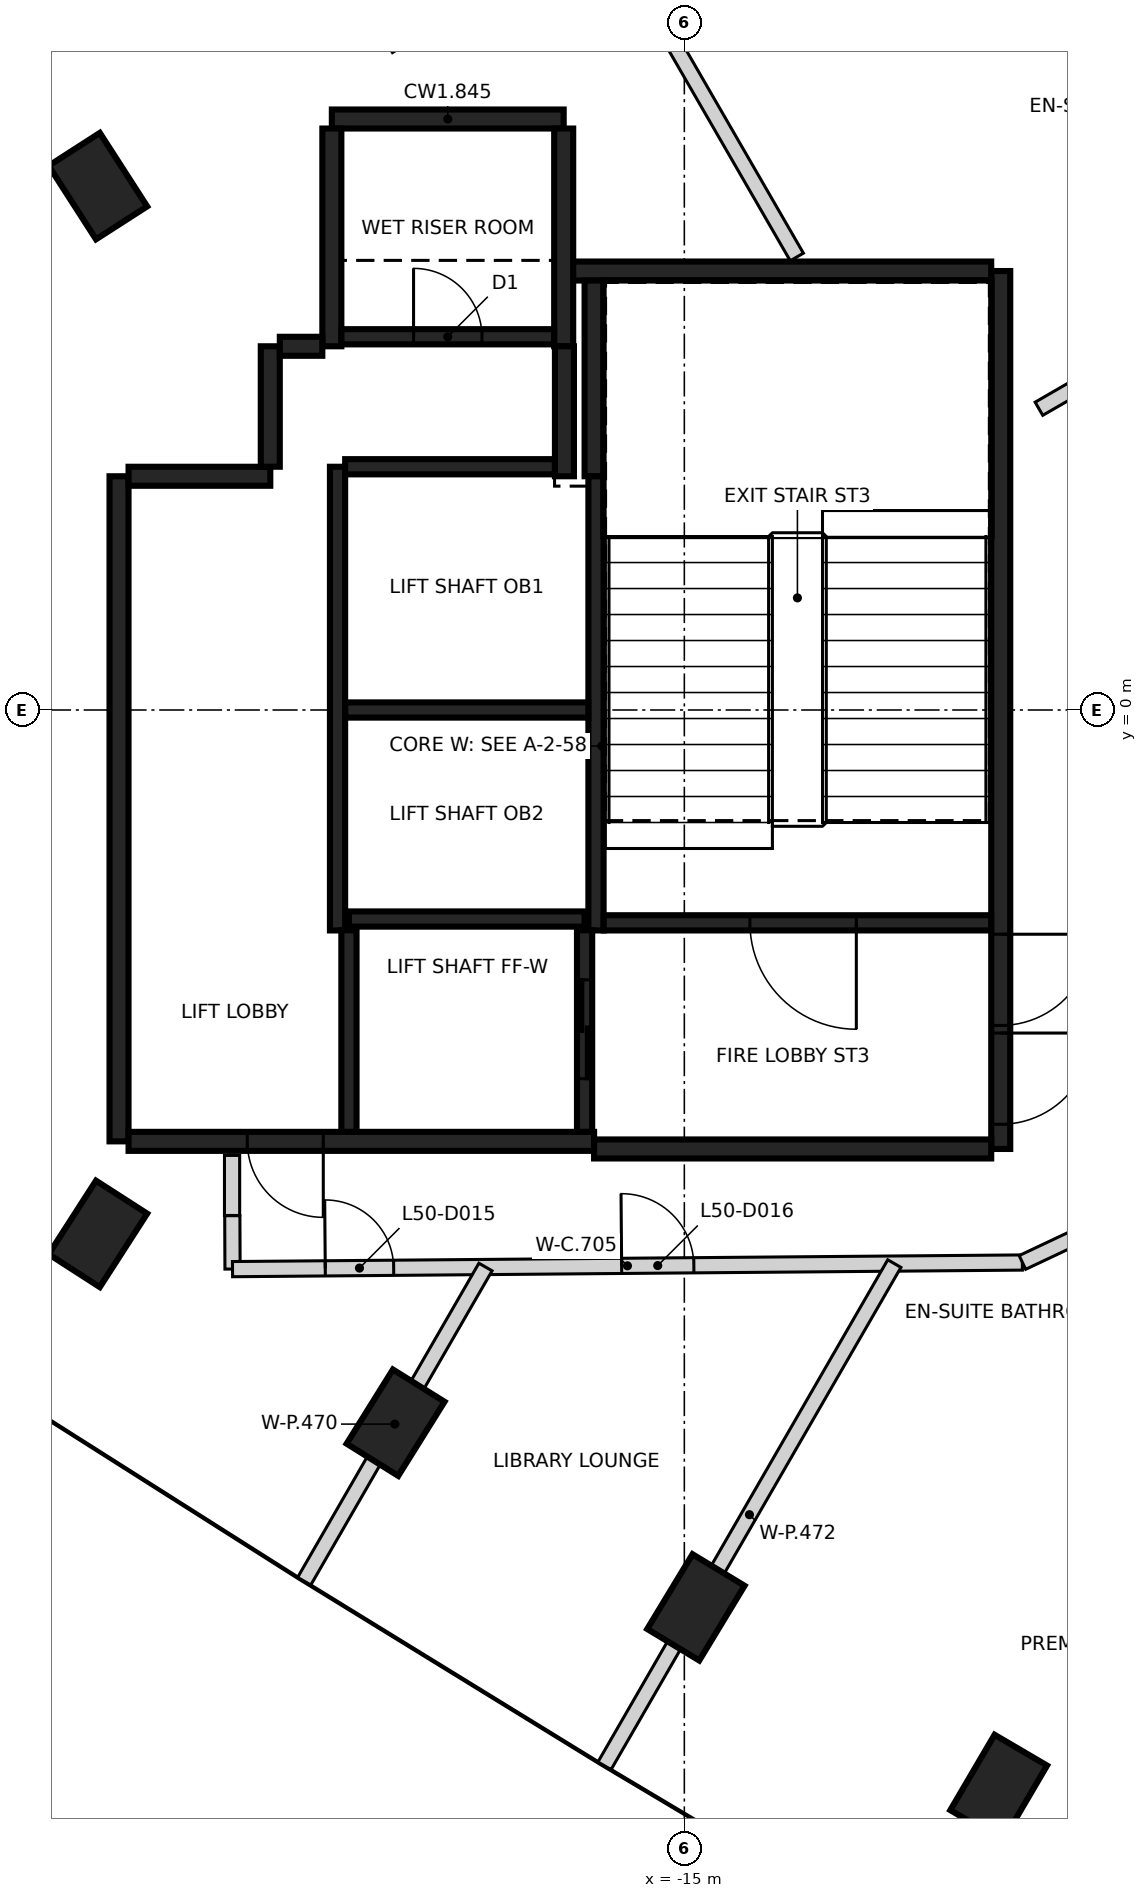
"""IFC4 building model, lengths in metres.
Left out: names, types, materials, properties, quantities, classifications, styles, units other than length and angle.
Written with IfcOpenShell. Run it as: python <this file> out.ifc"""

import sys

from ifc_helpers import new_model, si_unit, direction, frame, frame_2d, origin, origin_2d, place, context, subcontext, project, spatial, rectangle, extrude, element, fill, save


model = new_model("IFC4")
c1 = context("Model", 3, precision=1e-05, world=origin(), true_north=direction((0.0, 1.0)))
c2 = subcontext(c1, "Body", "Model", "MODEL_VIEW")
j1 = project(units=[si_unit("LENGTHUNIT", "METRE"), si_unit("PLANEANGLEUNIT", "RADIAN")], contexts=[c1])
p1 = place(None, origin())
s1 = spatial("IfcSite", under=j1, at=p1, CompositionType="ELEMENT")
p2 = place(p1, origin())
s2 = spatial("IfcBuilding", under=s1, at=p2, CompositionType="ELEMENT")
p3 = place(p2, frame((0.0, 0.0, 200.8)))
s3 = spatial("IfcBuildingStorey", under=s2, at=p3, CompositionType="ELEMENT", Elevation=200.8)
for number, where, z_axis, x_axis in (
    (1, (-22.715, 6.892, -0.35), (0.0, 0.0, 1.0), (-0.541, 0.841, 0.0)),
    (2, (-22.715, -6.892, -0.35), (0.0, 0.0, 1.0), (0.541, 0.841, 0.0)),
    (3, (-18.799, -9.376, -0.35), (0.0, 0.0, 1.0), (0.529, 0.848, 0.0)),
    (4, (-14.848, -11.806, -0.35), (0.0, 0.0, 1.0), (0.518, 0.855, 0.0)),
    (5, (-10.864, -14.18, -0.35), (0.0, 0.0, 1.0), (0.506, 0.862, 0.0)),
):
    element("IfcColumn", number, at=place(p3, frame(where, z_axis=z_axis, x_axis=x_axis)), inside=s3, PredefinedType="COLUMN", context=c2, shape_type="SweptSolid", body=[
        extrude(rectangle(XDim=1.15, YDim=0.8, at=origin_2d()), origin(), (0.0, 0.0, 1.0), 3.6),
    ])
p4 = place(p3, frame((-10.837, 5.775, 0.0), z_axis=(0.0, 0.0, 1.0), x_axis=(0.0, -1.0, 0.0)))
e6 = element("IfcWall", 6, at=p4, inside=s3, PredefinedType="SHEAR", context=c2, shape_type="SweptSolid", body=[
    extrude(rectangle(XDim=11.55, YDim=0.25, at=frame_2d((5.775, 0.0))), origin(), (0.0, 0.0, 1.0), 3.25),
])
p5 = place(p4, frame((10.025, 0.0, 0.0)))
e7 = element("IfcOpeningElement", 7, at=p5, cuts=e6, PredefinedType="OPENING", context=c2, shape_type="SweptSolid", body=[
    extrude(rectangle(XDim=1.2, YDim=2.1, at=frame_2d((0.6, 1.05))), frame((0.0, 0.135, 0.0), z_axis=(0.0, -1.0, 0.0), x_axis=(1.0, 0.0, 0.0)), (0.0, 0.0, 1.0), 0.27),
])
p6 = place(p4, frame((8.725, 0.0, 0.0)))
e8 = element("IfcOpeningElement", 8, at=p6, cuts=e6, PredefinedType="OPENING", context=c2, shape_type="SweptSolid", body=[
    extrude(rectangle(XDim=1.2, YDim=2.1, at=frame_2d((0.6, 1.05))), frame((0.0, 0.135, 0.0), z_axis=(0.0, -1.0, 0.0), x_axis=(1.0, 0.0, 0.0)), (0.0, 0.0, 1.0), 0.27),
])
p7 = place(p3, frame((-22.437, -5.675, 0.0), z_axis=(0.0, 0.0, 1.0), x_axis=(0.0, 1.0, 0.0)))
e9 = element("IfcWall", 9, at=p7, inside=s3, PredefinedType="SHEAR", context=c2, shape_type="SweptSolid", body=[
    extrude(rectangle(XDim=8.75, YDim=0.25, at=frame_2d((4.375, 0.0))), origin(), (0.0, 0.0, 1.0), 3.25),
])
p8 = place(p3, frame((-16.187, -5.675, 0.0), z_axis=(0.0, 0.0, 1.0), x_axis=(-1.0, 0.0, 0.0)))
e10 = element("IfcWall", 10, at=p8, inside=s3, PredefinedType="SHEAR", context=c2, shape_type="SweptSolid", body=[
    extrude(rectangle(XDim=6.125, YDim=0.25, at=frame_2d((3.062, 0.0))), origin(), (0.0, 0.0, 1.0), 3.25),
])
p9 = place(p8, frame((3.563, 0.0, 0.0)))
e11 = element("IfcOpeningElement", 11, at=p9, cuts=e10, PredefinedType="OPENING", context=c2, shape_type="SweptSolid", body=[
    extrude(rectangle(XDim=1.0, YDim=2.1, at=frame_2d((0.5, 1.05))), frame((0.0, 0.135, 0.0), z_axis=(0.0, -1.0, 0.0), x_axis=(1.0, 0.0, 0.0)), (0.0, 0.0, 1.0), 0.27),
])
p10 = place(p3, frame((-10.963, -5.775, 0.0), z_axis=(0.0, 0.0, 1.0), x_axis=(-1.0, 0.0, 0.0)))
e12 = element("IfcWall", 12, at=p10, inside=s3, PredefinedType="SHEAR", context=c2, shape_type="SweptSolid", body=[
    extrude(rectangle(XDim=5.225, YDim=0.25, at=frame_2d((2.612, 0.0))), origin(), (0.0, 0.0, 1.0), 3.25),
])
p11 = place(p3, frame((-16.472, 5.775, 0.0), z_axis=(0.0, 0.0, 1.0), x_axis=(1.0, 0.0, 0.0)))
e13 = element("IfcWall", 13, at=p11, inside=s3, PredefinedType="SHEAR", context=c2, shape_type="SweptSolid", body=[
    extrude(rectangle(XDim=5.51, YDim=0.25, at=frame_2d((2.755, 0.0))), origin(), (0.0, 0.0, 1.0), 3.25),
])
p12 = place(p3, frame((-19.637, 7.775, 0.0), z_axis=(0.0, 0.0, 1.0), x_axis=(1.0, 0.0, 0.0)))
e14 = element("IfcWall", 14, at=p12, inside=s3, PredefinedType="SHEAR", context=c2, shape_type="SweptSolid", body=[
    extrude(rectangle(XDim=3.05, YDim=0.25, at=frame_2d((1.525, 0.0))), origin(), (0.0, 0.0, 1.0), 3.25),
])
for number, where, z_axis, x_axis in (
    (15, (-16.587, 7.65, 0.0), (0.0, 0.0, 1.0), (0.0, -1.0, 0.0)),
    (16, (-19.637, 4.785, 0.0), (0.0, 0.0, 1.0), (0.0, 1.0, 0.0)),
):
    element("IfcWall", number, at=place(p3, frame(where, z_axis=z_axis, x_axis=x_axis)), inside=s3, PredefinedType="SHEAR", context=c2, shape_type="SweptSolid", body=[
        extrude(rectangle(XDim=2.865, YDim=0.25, at=frame_2d((1.432, 0.0))), origin(), (0.0, 0.0, 1.0), 3.25),
    ])
p13 = place(p3, frame((-16.187, 3.075, 0.0), z_axis=(0.0, 0.0, 1.0), x_axis=(0.0, 1.0, 0.0)))
e17 = element("IfcWall", 17, at=p13, inside=s3, PredefinedType="SHEAR", context=c2, shape_type="SweptSolid", body=[
    extrude(rectangle(XDim=2.575, YDim=0.25, at=frame_2d((1.287, 0.0))), origin(), (0.0, 0.0, 1.0), 3.25),
])
p14 = place(p3, frame((-22.312, 3.075, 0.0), z_axis=(0.0, 0.0, 1.0), x_axis=(1.0, 0.0, 0.0)))
e18 = element("IfcWall", 18, at=p14, inside=s3, PredefinedType="SHEAR", context=c2, shape_type="SweptSolid", body=[
    extrude(rectangle(XDim=1.865, YDim=0.25, at=frame_2d((0.932, 0.0))), origin(), (0.0, 0.0, 1.0), 3.25),
])
p15 = place(p3, frame((-16.577, 4.785, 0.0), z_axis=(0.0, 0.0, 1.0), x_axis=(0.0, -1.0, 0.0)))
e19 = element("IfcWall", 19, at=p15, inside=s3, PredefinedType="SHEAR", context=c2, shape_type="SweptSolid", body=[
    extrude(rectangle(XDim=1.71, YDim=0.25, at=frame_2d((0.855, 0.0))), origin(), (0.0, 0.0, 1.0), 3.25),
])
p16 = place(p3, frame((-20.447, 3.2, 0.0), z_axis=(0.0, 0.0, 1.0), x_axis=(0.0, 1.0, 0.0)))
e20 = element("IfcWall", 20, at=p16, inside=s3, PredefinedType="SHEAR", context=c2, shape_type="SweptSolid", body=[
    extrude(rectangle(XDim=1.584, YDim=0.25, at=frame_2d((0.792, 0.0))), origin(), (0.0, 0.0, 1.0), 3.25),
])
p17 = place(p3, frame((-20.322, 4.785, 0.0), z_axis=(0.0, 0.0, 1.0), x_axis=(1.0, 0.0, 0.0)))
e21 = element("IfcWall", 21, at=p17, inside=s3, PredefinedType="SHEAR", context=c2, shape_type="SweptSolid", body=[
    extrude(rectangle(XDim=0.559, YDim=0.25, at=frame_2d((0.28, 0.0))), origin(), (0.0, 0.0, 1.0), 3.25),
])
p18 = place(p3, frame((-16.162, 3.074, 0.0), z_axis=(0.0, 0.0, 1.0), x_axis=(0.0, -1.0, 0.0)))
e22 = element("IfcWall", 22, at=p18, inside=s3, PredefinedType="SHEAR", context=c2, shape_type="SweptSolid", body=[
    extrude(rectangle(XDim=5.974, YDim=0.2, at=frame_2d((2.987, 0.0))), origin(), (0.0, 0.0, 1.0), 3.25),
])
p19 = place(p3, frame((-19.562, -2.9, 0.0), z_axis=(0.0, 0.0, 1.0), x_axis=(0.0, 1.0, 0.0)))
e23 = element("IfcWall", 23, at=p19, inside=s3, PredefinedType="SHEAR", context=c2, shape_type="SweptSolid", body=[
    extrude(rectangle(XDim=6.1, YDim=0.2, at=frame_2d((3.05, 0.0))), origin(), (0.0, 0.0, 1.0), 3.25),
])
p20 = place(p3, frame((-10.963, -2.8, 0.0), z_axis=(0.0, 0.0, 1.0), x_axis=(-1.0, 0.0, 0.0)))
e24 = element("IfcWall", 24, at=p20, inside=s3, PredefinedType="SHEAR", context=c2, shape_type="SweptSolid", body=[
    extrude(rectangle(XDim=5.098, YDim=0.2, at=frame_2d((2.549, 0.0))), origin(), (0.0, 0.0, 1.0), 3.25),
])
p21 = place(p20, frame((1.774, 0.0, 0.0)))
e25 = element("IfcOpeningElement", 25, at=p21, cuts=e24, PredefinedType="OPENING", context=c2, shape_type="SweptSolid", body=[
    extrude(rectangle(XDim=1.4, YDim=2.1, at=frame_2d((0.7, 1.05))), frame((0.0, 0.11, 0.0), z_axis=(0.0, -1.0, 0.0), x_axis=(1.0, 0.0, 0.0)), (0.0, 0.0, 1.0), 0.22),
])
p22 = place(p3, frame((-16.263, 0.0, 0.0), z_axis=(0.0, 0.0, 1.0), x_axis=(-1.0, 0.0, 0.0)))
e26 = element("IfcWall", 26, at=p22, inside=s3, PredefinedType="SHEAR", context=c2, shape_type="SweptSolid", body=[
    extrude(rectangle(XDim=3.198, YDim=0.2, at=frame_2d((1.599, 0.0))), origin(), (0.0, 0.0, 1.0), 3.25),
])
p23 = place(p3, frame((-19.511, 4.91, 0.0), z_axis=(0.0, 0.0, 1.0), x_axis=(1.0, 0.0, 0.0)))
e27 = element("IfcWall", 27, at=p23, inside=s3, PredefinedType="SHEAR", context=c2, shape_type="SweptSolid", body=[
    extrude(rectangle(XDim=2.798, YDim=0.2, at=frame_2d((1.399, 0.0))), origin(), (0.0, 0.0, 1.0), 3.25),
])
p24 = place(p23, frame((0.949, 0.0, 0.0)))
e28 = element("IfcOpeningElement", 28, at=p24, cuts=e27, PredefinedType="OPENING", context=c2, shape_type="SweptSolid", body=[
    extrude(rectangle(XDim=0.9, YDim=2.1, at=frame_2d((0.45, 1.05))), frame((0.0, 0.11, 0.0), z_axis=(0.0, -1.0, 0.0), x_axis=(1.0, 0.0, 0.0)), (0.0, 0.0, 1.0), 0.22),
])
p25 = place(p3, frame((-19.462, 3.2, 0.0), z_axis=(0.0, 0.0, 1.0), x_axis=(1.0, 0.0, 0.0)))
e29 = element("IfcWall", 29, at=p25, inside=s3, PredefinedType="SHEAR", context=c2, shape_type="SweptSolid", body=[
    extrude(rectangle(XDim=2.759, YDim=0.2, at=frame_2d((1.379, 0.0))), origin(), (0.0, 0.0, 1.0), 3.25),
])
p26 = place(p3, frame((-19.412, -2.75, 0.0), z_axis=(0.0, 0.0, 1.0), x_axis=(1.0, 0.0, 0.0)))
e30 = element("IfcWall", 30, at=p26, inside=s3, PredefinedType="SHEAR", context=c2, shape_type="SweptSolid", body=[
    extrude(rectangle(XDim=3.1, YDim=0.2, at=frame_2d((1.55, 0.0))), origin(), (0.0, 0.0, 1.0), 3.25),
])
p27 = place(p3, frame((-16.312, -2.898, 0.0), z_axis=(0.0, 0.0, 1.0), x_axis=(0.0, -1.0, 0.0)))
e31 = element("IfcWall", 31, at=p27, inside=s3, PredefinedType="SHEAR", context=c2, shape_type="SweptSolid", body=[
    extrude(rectangle(XDim=2.651, YDim=0.2, at=frame_2d((1.325, 0.0))), origin(), (0.0, 0.0, 1.0), 3.25),
])
p28 = place(p27, frame((0.652, 0.0, 0.0)))
e32 = element("IfcOpeningElement", 32, at=p28, cuts=e31, PredefinedType="OPENING", context=c2, shape_type="SweptSolid", body=[
    extrude(rectangle(XDim=1.3, YDim=2.1, at=frame_2d((0.65, 1.05))), frame((0.0, 0.11, 0.0), z_axis=(0.0, -1.0, 0.0), x_axis=(1.0, 0.0, 0.0)), (0.0, 0.0, 1.0), 0.22),
])
p29 = place(p3, frame((-19.412, -5.549, 0.0), z_axis=(0.0, 0.0, 1.0), x_axis=(0.0, 1.0, 0.0)))
e33 = element("IfcWall", 33, at=p29, inside=s3, PredefinedType="SHEAR", context=c2, shape_type="SweptSolid", body=[
    extrude(rectangle(XDim=2.651, YDim=0.2, at=frame_2d((1.325, 0.0))), origin(), (0.0, 0.0, 1.0), 3.25),
])
p30 = place(p3, frame((-20.95, -6.65, 0.0), z_axis=(0.0, 0.0, 1.0), x_axis=(0.0, 1.0, 0.0)))
e34 = element("IfcWall", 34, at=p30, inside=s3, PredefinedType="PARTITIONING", context=c2, shape_type="SweptSolid", body=[
    extrude(rectangle(XDim=0.79, YDim=0.2, at=frame_2d((0.395, 0.0))), origin(), (0.0, 0.0, 1.0), 3.25),
])
p31 = place(p3, frame((-20.947, -6.653, 0.0), z_axis=(0.0, 0.0, 1.0), x_axis=(0.004173876686, -0.999991289339, 0.0)))
e35 = element("IfcWall", 35, at=p31, inside=s3, PredefinedType="PARTITIONING", context=c2, shape_type="SweptSolid", body=[
    extrude(rectangle(XDim=0.702, YDim=0.2, at=frame_2d((0.351, 0.0))), origin(), (0.0, 0.0, 1.0), 3.25),
])
p32 = place(p3, frame((-20.944, -7.356, 0.0), z_axis=(0.0, 0.0, 1.0), x_axis=(0.999964824566, 0.00838746869, 0.0)))
e36 = element("IfcWall", 36, at=p32, inside=s3, PredefinedType="PARTITIONING", context=c2, shape_type="SweptSolid", body=[
    extrude(rectangle(XDim=10.391, YDim=0.2, at=frame_2d((5.196, 0.0))), origin(), (0.0, 0.0, 1.0), 3.25),
])
p33 = place(p32, frame((1.22, 0.0, 0.0)))
e37 = element("IfcOpeningElement", 37, at=p33, cuts=e36, PredefinedType="OPENING", context=c2, shape_type="SweptSolid", body=[
    extrude(rectangle(XDim=0.9, YDim=2.1, at=frame_2d((0.45, 1.05))), frame((0.0, 0.11, 0.0), z_axis=(0.0, -1.0, 0.0), x_axis=(1.0, 0.0, 0.0)), (0.0, 0.0, 1.0), 0.22),
])
p34 = place(p32, frame((5.119, 0.0, 0.0)))
e38 = element("IfcOpeningElement", 38, at=p34, cuts=e36, PredefinedType="OPENING", context=c2, shape_type="SweptSolid", body=[
    extrude(rectangle(XDim=0.95, YDim=2.1, at=frame_2d((0.475, 1.05))), frame((0.0, 0.11, 0.0), z_axis=(0.0, -1.0, 0.0), x_axis=(1.0, 0.0, 0.0)), (0.0, 0.0, 1.0), 0.22),
])
p35 = place(p3, frame((-10.552, -7.268, 0.0), z_axis=(0.0, 0.0, 1.0), x_axis=(0.904331815333, 0.426830139255, 0.0)))
e39 = element("IfcWall", 39, at=p35, inside=s3, PredefinedType="PARTITIONING", context=c2, shape_type="SweptSolid", body=[
    extrude(rectangle(XDim=0.944, YDim=0.2, at=frame_2d((0.472, 0.0))), origin(), (0.0, 0.0, 1.0), 3.25),
])
p36 = place(p3, frame((-10.334, 3.963, 0.0), z_axis=(0.0, 0.0, 1.0), x_axis=(0.866013159114, 0.500021207791, 0.0)))
e40 = element("IfcWall", 40, at=p36, inside=s3, PredefinedType="PARTITIONING", context=c2, shape_type="SweptSolid", body=[
    extrude(rectangle(XDim=11.931, YDim=0.2, at=frame_2d((5.966, 0.0))), origin(), (0.0, 0.0, 1.0), 3.25),
])
p37 = place(p36, frame((10.103, 0.0, 0.0)))
e41 = element("IfcOpeningElement", 41, at=p37, cuts=e40, PredefinedType="OPENING", context=c2, shape_type="SweptSolid", body=[
    extrude(rectangle(XDim=1.0, YDim=2.1, at=frame_2d((0.5, 1.05))), frame((0.0, 0.11, 0.0), z_axis=(0.0, -1.0, 0.0), x_axis=(1.0, 0.0, 0.0)), (0.0, 0.0, 1.0), 0.22),
])
p38 = place(p36, frame((8.149, 0.0, 0.0)))
e42 = element("IfcOpeningElement", 42, at=p38, cuts=e40, PredefinedType="OPENING", context=c2, shape_type="SweptSolid", body=[
    extrude(rectangle(XDim=0.95, YDim=2.1, at=frame_2d((0.475, 1.05))), frame((0.0, 0.11, 0.0), z_axis=(0.0, -1.0, 0.0), x_axis=(1.0, 0.0, 0.0)), (0.0, 0.0, 1.0), 0.22),
])
p39 = place(p36, frame((1.831, 0.0, 0.0)))
e43 = element("IfcOpeningElement", 43, at=p39, cuts=e40, PredefinedType="OPENING", context=c2, shape_type="SweptSolid", body=[
    extrude(rectangle(XDim=1.0, YDim=2.1, at=frame_2d((0.5, 1.05))), frame((0.0, 0.11, 0.0), z_axis=(0.0, -1.0, 0.0), x_axis=(1.0, 0.0, 0.0)), (0.0, 0.0, 1.0), 0.22),
])
p40 = place(p3, frame((-20.001, -11.461, 0.0), z_axis=(0.0, 0.0, 1.0), x_axis=(0.499749027893, 0.866170254119, 0.0)))
e44 = element("IfcWall", 44, at=p40, inside=s3, PredefinedType="PARTITIONING", context=c2, shape_type="SweptSolid", body=[
    extrude(rectangle(XDim=4.772, YDim=0.2, at=frame_2d((2.386, 0.0))), origin(), (0.0, 0.0, 1.0), 3.25),
])
p41 = place(p3, frame((-17.562, 12.961, 0.0), z_axis=(0.0, 0.0, 1.0), x_axis=(0.500056194816, -0.865992957262, 0.0)))
e45 = element("IfcWall", 45, at=p41, inside=s3, PredefinedType="PARTITIONING", context=c2, shape_type="SweptSolid", body=[
    extrude(rectangle(XDim=8.084, YDim=0.2, at=frame_2d((4.042, 0.0))), origin(), (0.0, 0.0, 1.0), 2.35),
])
p42 = place(p3, frame((-16.05, -13.89, 0.0), z_axis=(0.0, 0.0, 1.0), x_axis=(0.499849898665, 0.866112047488, 0.0)))
e46 = element("IfcWall", 46, at=p42, inside=s3, PredefinedType="PARTITIONING", context=c2, shape_type="SweptSolid", body=[
    extrude(rectangle(XDim=7.628, YDim=0.2, at=frame_2d((3.814, 0.0))), origin(), (0.0, 0.0, 1.0), 3.25),
])
p43 = place(p3, frame((-12.067, 16.263, 0.0), z_axis=(0.0, 0.0, 1.0), x_axis=(0.499975646431, -0.866039463868, 0.0)))
e47 = element("IfcWall", 47, at=p43, inside=s3, PredefinedType="PARTITIONING", context=c2, shape_type="SweptSolid", body=[
    extrude(rectangle(XDim=11.519, YDim=0.2, at=frame_2d((5.759, 0.0))), origin(), (0.0, 0.0, 1.0), 3.25),
])
p44 = place(p28, origin())
e48 = element("IfcDoor", 48, at=p44, inside=s3, OperationType="SLIDING_TO_RIGHT", PredefinedType="DOOR", context=c2, shape_type="SweptSolid", body=[
    extrude(rectangle(XDim=1.3, YDim=2.1, at=frame_2d((0.65, 1.05))), frame((0.0, 0.025, 0.0), z_axis=(0.0, -1.0, 0.0), x_axis=(1.0, 0.0, 0.0)), (0.0, 0.0, 1.0), 0.05),
])
fill(e32, e48)
p45 = place(p9, origin())
e49 = element("IfcDoor", 49, at=p45, inside=s3, OperationType="SINGLE_SWING_LEFT", PredefinedType="DOOR", context=c2, shape_type="SweptSolid", body=[
    extrude(rectangle(XDim=1.0, YDim=2.1, at=frame_2d((0.5, 1.05))), frame((0.0, 0.025, 0.0), z_axis=(0.0, -1.0, 0.0), x_axis=(1.0, 0.0, 0.0)), (0.0, 0.0, 1.0), 0.05),
])
fill(e11, e49)
p46 = place(p5, origin())
e50 = element("IfcDoor", 50, at=p46, inside=s3, OperationType="SINGLE_SWING_LEFT", PredefinedType="DOOR", context=c2, shape_type="SweptSolid", body=[
    extrude(rectangle(XDim=1.2, YDim=2.1, at=frame_2d((0.6, 1.05))), frame((0.0, 0.025, 0.0), z_axis=(0.0, -1.0, 0.0), x_axis=(1.0, 0.0, 0.0)), (0.0, 0.0, 1.0), 0.05),
])
fill(e7, e50)
p47 = place(p6, origin())
e51 = element("IfcDoor", 51, at=p47, inside=s3, OperationType="SINGLE_SWING_RIGHT", PredefinedType="DOOR", context=c2, shape_type="SweptSolid", body=[
    extrude(rectangle(XDim=1.2, YDim=2.1, at=frame_2d((0.6, 1.05))), frame((0.0, 0.025, 0.0), z_axis=(0.0, -1.0, 0.0), x_axis=(1.0, 0.0, 0.0)), (0.0, 0.0, 1.0), 0.05),
])
fill(e8, e51)
p48 = place(p21, origin())
e52 = element("IfcDoor", 52, at=p48, inside=s3, OperationType="SINGLE_SWING_RIGHT", PredefinedType="DOOR", context=c2, shape_type="SweptSolid", body=[
    extrude(rectangle(XDim=1.4, YDim=2.1, at=frame_2d((0.7, 1.05))), frame((0.0, 0.025, 0.0), z_axis=(0.0, -1.0, 0.0), x_axis=(1.0, 0.0, 0.0)), (0.0, 0.0, 1.0), 0.05),
])
fill(e25, e52)
p49 = place(p24, origin())
e53 = element("IfcDoor", 53, at=p49, inside=s3, OperationType="SINGLE_SWING_LEFT", PredefinedType="DOOR", context=c2, shape_type="SweptSolid", body=[
    extrude(rectangle(XDim=0.9, YDim=2.1, at=frame_2d((0.45, 1.05))), frame((0.0, 0.025, 0.0), z_axis=(0.0, -1.0, 0.0), x_axis=(1.0, 0.0, 0.0)), (0.0, 0.0, 1.0), 0.05),
])
fill(e28, e53)
p50 = place(p33, origin())
e54 = element("IfcDoor", 54, at=p50, inside=s3, OperationType="SINGLE_SWING_LEFT", PredefinedType="DOOR", context=c2, shape_type="SweptSolid", body=[
    extrude(rectangle(XDim=0.9, YDim=2.1, at=frame_2d((0.45, 1.05))), frame((0.0, 0.025, 0.0), z_axis=(0.0, -1.0, 0.0), x_axis=(1.0, 0.0, 0.0)), (0.0, 0.0, 1.0), 0.05),
])
fill(e37, e54)
p51 = place(p34, frame((0.95, 0.0, 0.0), z_axis=(0.0, 0.0, 1.0), x_axis=(-1.0, 0.0, 0.0)))
e55 = element("IfcDoor", 55, at=p51, inside=s3, OperationType="SINGLE_SWING_LEFT", PredefinedType="DOOR", context=c2, shape_type="SweptSolid", body=[
    extrude(rectangle(XDim=0.95, YDim=2.1, at=frame_2d((0.475, 1.05))), frame((0.0, 0.025, 0.0), z_axis=(0.0, -1.0, 0.0), x_axis=(1.0, 0.0, 0.0)), (0.0, 0.0, 1.0), 0.05),
])
fill(e38, e55)
save(model, sys.argv[1])
